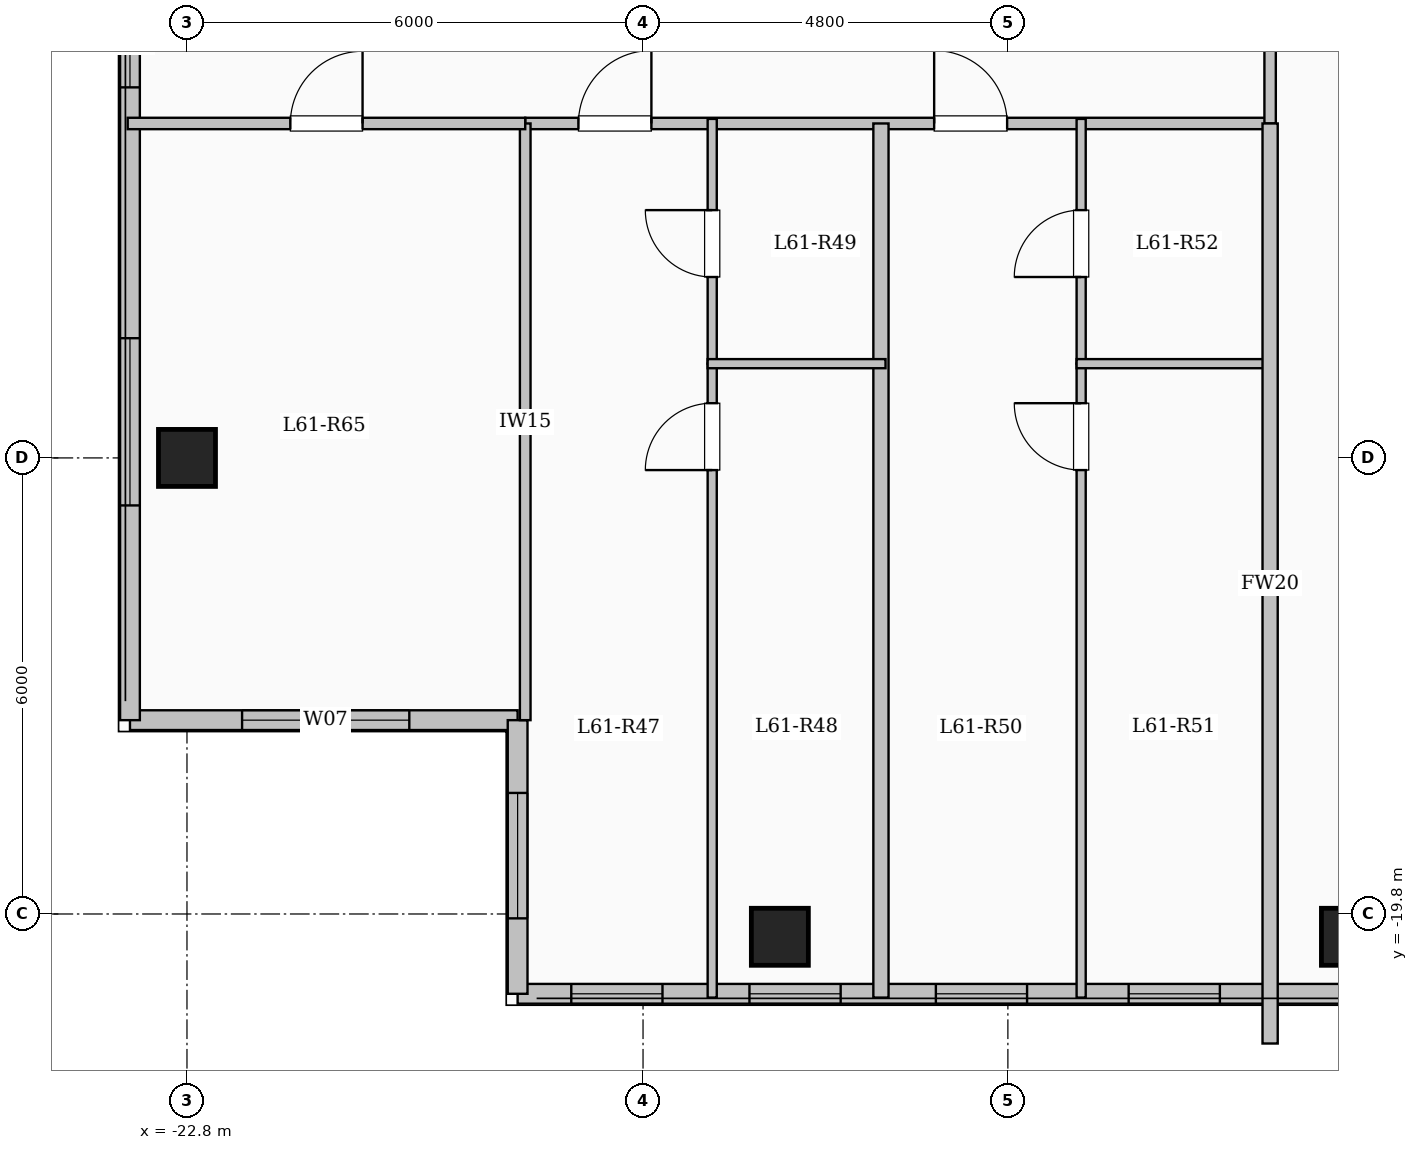
"""IFC4 building model, lengths in metres.
Left out: names, types, materials, properties, quantities, classifications, styles, units other than length and angle.
Written with IfcOpenShell. Run it as: python <this file> out.ifc"""

import sys

from ifc_helpers import new_model, si_unit, direction, frame, frame_2d, origin, origin_2d, place, context, subcontext, project, spatial, rectangle, extrude, element, fill, save


model = new_model("IFC4")
c1 = context("Model", 3, precision=1e-05, world=origin(), true_north=direction((0.0, 1.0)))
c2 = subcontext(c1, "Body", "Model", "MODEL_VIEW")
j1 = project(units=[si_unit("LENGTHUNIT", "METRE"), si_unit("PLANEANGLEUNIT", "RADIAN")], contexts=[c1])
p1 = place(None, origin())
s1 = spatial("IfcSite", under=j1, at=p1, CompositionType="ELEMENT")
p2 = place(p1, origin())
s2 = spatial("IfcBuilding", under=s1, at=p2, CompositionType="ELEMENT")
p3 = place(p2, frame((0.0, 0.0, 223.75)))
s3 = spatial("IfcBuildingStorey", under=s2, at=p3, CompositionType="ELEMENT", Elevation=223.75)
for number, where, z_axis, x_axis in (
    (1, (-15.0, -20.1, 0.0), (0.0, 0.0, 1.0), (1.0, 0.0, 0.0)),
    (2, (-7.5, -20.1, 0.0), (0.0, 0.0, 1.0), (1.0, 0.0, 0.0)),
    (3, (-22.8, -13.8, 0.0), (0.0, 0.0, 1.0), (1.0, 0.0, 0.0)),
):
    element("IfcColumn", number, at=place(p3, frame(where, z_axis=z_axis, x_axis=x_axis)), inside=s3, PredefinedType="COLUMN", context=c2, shape_type="SweptSolid", body=[
        extrude(rectangle(XDim=0.75, YDim=0.75, at=origin_2d()), origin(), (0.0, 0.0, 1.0), 3.35),
    ])
p4 = place(p3, frame((-18.45, -17.25, 0.0), z_axis=(0.0, 0.0, 1.0), x_axis=(-1.0, 0.0, 0.0)))
e4 = element("IfcWall", 4, at=p4, inside=s3, PredefinedType="SOLIDWALL", context=c2, shape_type="SweptSolid", body=[
    extrude(rectangle(XDim=5.1, YDim=0.26, at=frame_2d((2.55, 0.0))), origin(), (0.0, 0.0, 1.0), 3.05),
])
p5 = place(p4, frame((1.425, 0.0, 0.9)))
e5 = element("IfcOpeningElement", 5, at=p5, cuts=e4, PredefinedType="OPENING", context=c2, shape_type="SweptSolid", body=[
    extrude(rectangle(XDim=2.2, YDim=1.75, at=frame_2d((1.1, 0.875))), frame((0.0, 0.14, 0.0), z_axis=(0.0, -1.0, 0.0), x_axis=(1.0, 0.0, 0.0)), (0.0, 0.0, 1.0), 0.28),
])
p6 = place(p3, frame((-23.55, -17.25, 0.0), z_axis=(0.0, 0.0, 1.0), x_axis=(0.0, 1.0, 0.0)))
e6 = element("IfcWall", 6, at=p6, inside=s3, PredefinedType="SOLIDWALL", context=c2, shape_type="SweptSolid", body=[
    extrude(rectangle(XDim=34.5, YDim=0.26, at=frame_2d((17.25, 0.0))), origin(), (0.0, 0.0, 1.0), 3.05),
])
p7 = place(p6, frame((2.825, 0.0, 0.9)))
e7 = element("IfcOpeningElement", 7, at=p7, cuts=e6, PredefinedType="OPENING", context=c2, shape_type="SweptSolid", body=[
    extrude(rectangle(XDim=2.2, YDim=1.75, at=frame_2d((1.1, 0.875))), frame((0.0, 0.14, 0.0), z_axis=(0.0, -1.0, 0.0), x_axis=(1.0, 0.0, 0.0)), (0.0, 0.0, 1.0), 0.28),
])
p8 = place(p6, frame((8.325, 0.0, 0.95)))
e8 = element("IfcOpeningElement", 8, at=p8, cuts=e6, PredefinedType="OPENING", context=c2, shape_type="SweptSolid", body=[
    extrude(rectangle(XDim=1.2, YDim=1.5, at=frame_2d((0.6, 0.75))), frame((0.0, 0.14, 0.0), z_axis=(0.0, -1.0, 0.0), x_axis=(1.0, 0.0, 0.0)), (0.0, 0.0, 1.0), 0.28),
])
p9 = place(p6, frame((13.25, 0.0, 0.9)))
e9 = element("IfcOpeningElement", 9, at=p9, cuts=e6, PredefinedType="OPENING", context=c2, shape_type="SweptSolid", body=[
    extrude(rectangle(XDim=2.2, YDim=1.75, at=frame_2d((1.1, 0.875))), frame((0.0, 0.14, 0.0), z_axis=(0.0, -1.0, 0.0), x_axis=(1.0, 0.0, 0.0)), (0.0, 0.0, 1.0), 0.28),
])
p10 = place(p6, frame((19.65, 0.0, 0.9)))
e10 = element("IfcOpeningElement", 10, at=p10, cuts=e6, PredefinedType="OPENING", context=c2, shape_type="SweptSolid", body=[
    extrude(rectangle(XDim=1.65, YDim=1.6, at=frame_2d((0.825, 0.8))), frame((0.0, 0.14, 0.0), z_axis=(0.0, -1.0, 0.0), x_axis=(1.0, 0.0, 0.0)), (0.0, 0.0, 1.0), 0.28),
])
p11 = place(p6, frame((24.125, 0.0, 0.9)))
e11 = element("IfcOpeningElement", 11, at=p11, cuts=e6, PredefinedType="OPENING", context=c2, shape_type="SweptSolid", body=[
    extrude(rectangle(XDim=2.0, YDim=1.7, at=frame_2d((1.0, 0.85))), frame((0.0, 0.14, 0.0), z_axis=(0.0, -1.0, 0.0), x_axis=(1.0, 0.0, 0.0)), (0.0, 0.0, 1.0), 0.28),
])
p12 = place(p6, frame((28.375, 0.0, 0.95)))
e12 = element("IfcOpeningElement", 12, at=p12, cuts=e6, PredefinedType="OPENING", context=c2, shape_type="SweptSolid", body=[
    extrude(rectangle(XDim=1.0, YDim=1.5, at=frame_2d((0.5, 0.75))), frame((0.0, 0.14, 0.0), z_axis=(0.0, -1.0, 0.0), x_axis=(1.0, 0.0, 0.0)), (0.0, 0.0, 1.0), 0.28),
])
p13 = place(p6, frame((31.125, 0.0, 0.9)))
e13 = element("IfcOpeningElement", 13, at=p13, cuts=e6, PredefinedType="OPENING", context=c2, shape_type="SweptSolid", body=[
    extrude(rectangle(XDim=2.0, YDim=1.7, at=frame_2d((1.0, 0.85))), frame((0.0, 0.14, 0.0), z_axis=(0.0, -1.0, 0.0), x_axis=(1.0, 0.0, 0.0)), (0.0, 0.0, 1.0), 0.28),
])
p14 = place(p3, frame((-7.35, -20.85, 0.0), z_axis=(0.0, 0.0, 1.0), x_axis=(-1.0, 0.0, 0.0)))
e14 = element("IfcWall", 14, at=p14, inside=s3, PredefinedType="SOLIDWALL", context=c2, shape_type="SweptSolid", body=[
    extrude(rectangle(XDim=11.1, YDim=0.26, at=frame_2d((5.55, 0.0))), origin(), (0.0, 0.0, 1.0), 3.05),
])
p15 = place(p14, frame((1.861, 0.0, 0.95)))
e15 = element("IfcOpeningElement", 15, at=p15, cuts=e14, PredefinedType="OPENING", context=c2, shape_type="SweptSolid", body=[
    extrude(rectangle(XDim=1.2, YDim=1.5, at=frame_2d((0.6, 0.75))), frame((0.0, 0.14, 0.0), z_axis=(0.0, -1.0, 0.0), x_axis=(1.0, 0.0, 0.0)), (0.0, 0.0, 1.0), 0.28),
])
p16 = place(p14, frame((4.397, 0.0, 0.95)))
e16 = element("IfcOpeningElement", 16, at=p16, cuts=e14, PredefinedType="OPENING", context=c2, shape_type="SweptSolid", body=[
    extrude(rectangle(XDim=1.2, YDim=1.5, at=frame_2d((0.6, 0.75))), frame((0.0, 0.14, 0.0), z_axis=(0.0, -1.0, 0.0), x_axis=(1.0, 0.0, 0.0)), (0.0, 0.0, 1.0), 0.28),
])
p17 = place(p14, frame((6.85, 0.0, 0.95)))
e17 = element("IfcOpeningElement", 17, at=p17, cuts=e14, PredefinedType="OPENING", context=c2, shape_type="SweptSolid", body=[
    extrude(rectangle(XDim=1.2, YDim=1.5, at=frame_2d((0.6, 0.75))), frame((0.0, 0.14, 0.0), z_axis=(0.0, -1.0, 0.0), x_axis=(1.0, 0.0, 0.0)), (0.0, 0.0, 1.0), 0.28),
])
p18 = place(p14, frame((9.194, 0.0, 0.95)))
e18 = element("IfcOpeningElement", 18, at=p18, cuts=e14, PredefinedType="OPENING", context=c2, shape_type="SweptSolid", body=[
    extrude(rectangle(XDim=1.2, YDim=1.5, at=frame_2d((0.6, 0.75))), frame((0.0, 0.14, 0.0), z_axis=(0.0, -1.0, 0.0), x_axis=(1.0, 0.0, 0.0)), (0.0, 0.0, 1.0), 0.28),
])
p19 = place(p3, frame((-18.45, -20.85, 0.0), z_axis=(0.0, 0.0, 1.0), x_axis=(0.0, 1.0, 0.0)))
e19 = element("IfcWall", 19, at=p19, inside=s3, PredefinedType="SOLIDWALL", context=c2, shape_type="SweptSolid", body=[
    extrude(rectangle(XDim=3.6, YDim=0.26, at=frame_2d((1.8, 0.0))), origin(), (0.0, 0.0, 1.0), 3.05),
])
p20 = place(p19, frame((0.992, 0.0, 0.9)))
e20 = element("IfcOpeningElement", 20, at=p20, cuts=e19, PredefinedType="OPENING", context=c2, shape_type="SweptSolid", body=[
    extrude(rectangle(XDim=1.65, YDim=1.6, at=frame_2d((0.825, 0.8))), frame((0.0, 0.14, 0.0), z_axis=(0.0, -1.0, 0.0), x_axis=(1.0, 0.0, 0.0)), (0.0, 0.0, 1.0), 0.28),
])
p21 = place(p3, frame((-18.35, -9.4, 0.0), z_axis=(0.0, 0.0, 1.0), x_axis=(1.0, 0.0, 0.0)))
e21 = element("IfcWall", 21, at=p21, inside=s3, PredefinedType="PARTITIONING", context=c2, shape_type="SweptSolid", body=[
    extrude(rectangle(XDim=9.8, YDim=0.15, at=frame_2d((4.9, 0.0))), origin(), (0.0, 0.0, 1.0), 3.05),
])
p22 = place(p21, frame((0.7, 0.0, 0.0)))
e22 = element("IfcOpeningElement", 22, at=p22, cuts=e21, PredefinedType="OPENING", context=c2, shape_type="SweptSolid", body=[
    extrude(rectangle(XDim=0.96, YDim=2.15, at=frame_2d((0.48, 1.075))), frame((0.0, 0.085, 0.0), z_axis=(0.0, -1.0, 0.0), x_axis=(1.0, 0.0, 0.0)), (0.0, 0.0, 1.0), 0.17),
])
p23 = place(p21, frame((5.38, 0.0, 0.0)))
e23 = element("IfcOpeningElement", 23, at=p23, cuts=e21, PredefinedType="OPENING", context=c2, shape_type="SweptSolid", body=[
    extrude(rectangle(XDim=0.96, YDim=2.15, at=frame_2d((0.48, 1.075))), frame((0.0, 0.085, 0.0), z_axis=(0.0, -1.0, 0.0), x_axis=(1.0, 0.0, 0.0)), (0.0, 0.0, 1.0), 0.17),
])
p24 = place(p3, frame((-8.55, -9.4, 0.0), z_axis=(0.0, 0.0, 1.0), x_axis=(0.0, 1.0, 0.0)))
e24 = element("IfcWall", 24, at=p24, inside=s3, PredefinedType="PARTITIONING", context=c2, shape_type="SweptSolid", body=[
    extrude(rectangle(XDim=2.15, YDim=0.15, at=frame_2d((1.075, 0.0))), origin(), (0.0, 0.0, 1.0), 3.05),
])
p25 = place(p3, frame((-13.67, -20.9, 0.0), z_axis=(0.0, 0.0, 1.0), x_axis=(0.0, 1.0, 0.0)))
e25 = element("IfcWall", 25, at=p25, inside=s3, PredefinedType="SOLIDWALL", context=c2, shape_type="SweptSolid", body=[
    extrude(rectangle(XDim=11.5, YDim=0.2, at=frame_2d((5.75, 0.0))), origin(), (0.0, 0.0, 1.0), 3.05),
])
p26 = place(p3, frame((-15.89, -20.9, 0.0), z_axis=(0.0, 0.0, 1.0), x_axis=(0.0, 1.0, 0.0)))
e26 = element("IfcWall", 26, at=p26, inside=s3, PredefinedType="PARTITIONING", context=c2, shape_type="SweptSolid", body=[
    extrude(rectangle(XDim=8.34, YDim=0.12, at=frame_2d((4.17, 0.0))), origin(), (0.0, 0.0, 1.0), 3.05),
])
p27 = place(p26, frame((6.94, 0.0, 0.0)))
e27 = element("IfcOpeningElement", 27, at=p27, cuts=e26, PredefinedType="OPENING", context=c2, shape_type="SweptSolid", body=[
    extrude(rectangle(XDim=0.88, YDim=2.1, at=frame_2d((0.44, 1.05))), frame((0.0, 0.07, 0.0), z_axis=(0.0, -1.0, 0.0), x_axis=(1.0, 0.0, 0.0)), (0.0, 0.0, 1.0), 0.14),
])
p28 = place(p3, frame((-15.89, -12.56, 0.0), z_axis=(0.0, 0.0, 1.0), x_axis=(0.0, 1.0, 0.0)))
e28 = element("IfcWall", 28, at=p28, inside=s3, PredefinedType="PARTITIONING", context=c2, shape_type="SweptSolid", body=[
    extrude(rectangle(XDim=3.22, YDim=0.12, at=frame_2d((1.61, 0.0))), origin(), (0.0, 0.0, 1.0), 3.05),
])
p29 = place(p28, frame((1.14, 0.0, 0.0)))
e29 = element("IfcOpeningElement", 29, at=p29, cuts=e28, PredefinedType="OPENING", context=c2, shape_type="SweptSolid", body=[
    extrude(rectangle(XDim=0.88, YDim=2.1, at=frame_2d((0.44, 1.05))), frame((0.0, 0.07, 0.0), z_axis=(0.0, -1.0, 0.0), x_axis=(1.0, 0.0, 0.0)), (0.0, 0.0, 1.0), 0.14),
])
p30 = place(p3, frame((-15.95, -12.56, 0.0), z_axis=(0.0, 0.0, 1.0), x_axis=(1.0, 0.0, 0.0)))
e30 = element("IfcWall", 30, at=p30, inside=s3, PredefinedType="PARTITIONING", context=c2, shape_type="SweptSolid", body=[
    extrude(rectangle(XDim=2.34, YDim=0.12, at=frame_2d((1.17, 0.0))), origin(), (0.0, 0.0, 1.0), 2.675),
])
p31 = place(p3, frame((-11.036, -20.9, 0.0), z_axis=(0.0, 0.0, 1.0), x_axis=(0.0, 1.0, 0.0)))
e31 = element("IfcWall", 31, at=p31, inside=s3, PredefinedType="PARTITIONING", context=c2, shape_type="SweptSolid", body=[
    extrude(rectangle(XDim=8.34, YDim=0.12, at=frame_2d((4.17, 0.0))), origin(), (0.0, 0.0, 1.0), 3.05),
])
p32 = place(p31, frame((6.94, 0.0, 0.0)))
e32 = element("IfcOpeningElement", 32, at=p32, cuts=e31, PredefinedType="OPENING", context=c2, shape_type="SweptSolid", body=[
    extrude(rectangle(XDim=0.88, YDim=2.1, at=frame_2d((0.44, 1.05))), frame((0.0, 0.07, 0.0), z_axis=(0.0, -1.0, 0.0), x_axis=(1.0, 0.0, 0.0)), (0.0, 0.0, 1.0), 0.14),
])
p33 = place(p3, frame((-11.036, -12.56, 0.0), z_axis=(0.0, 0.0, 1.0), x_axis=(0.0, 1.0, 0.0)))
e33 = element("IfcWall", 33, at=p33, inside=s3, PredefinedType="PARTITIONING", context=c2, shape_type="SweptSolid", body=[
    extrude(rectangle(XDim=3.22, YDim=0.12, at=frame_2d((1.61, 0.0))), origin(), (0.0, 0.0, 1.0), 3.05),
])
p34 = place(p33, frame((1.14, 0.0, 0.0)))
e34 = element("IfcOpeningElement", 34, at=p34, cuts=e33, PredefinedType="OPENING", context=c2, shape_type="SweptSolid", body=[
    extrude(rectangle(XDim=0.88, YDim=2.1, at=frame_2d((0.44, 1.05))), frame((0.0, 0.07, 0.0), z_axis=(0.0, -1.0, 0.0), x_axis=(1.0, 0.0, 0.0)), (0.0, 0.0, 1.0), 0.14),
])
p35 = place(p3, frame((-11.096, -12.56, 0.0), z_axis=(0.0, 0.0, 1.0), x_axis=(1.0, 0.0, 0.0)))
e35 = element("IfcWall", 35, at=p35, inside=s3, PredefinedType="PARTITIONING", context=c2, shape_type="SweptSolid", body=[
    extrude(rectangle(XDim=2.556, YDim=0.12, at=frame_2d((1.278, 0.0))), origin(), (0.0, 0.0, 1.0), 2.675),
])
p36 = place(p3, frame((-8.55, -21.504, 0.0), z_axis=(0.0, 0.0, 1.0), x_axis=(0.0, 1.0, 0.0)))
e36 = element("IfcWall", 36, at=p36, inside=s3, PredefinedType="SOLIDWALL", context=c2, shape_type="SweptSolid", body=[
    extrude(rectangle(XDim=12.104, YDim=0.2, at=frame_2d((6.052, 0.0))), origin(), (0.0, 0.0, 1.0), 3.05),
])
p37 = place(p3, frame((-18.35, -17.25, 0.0), z_axis=(0.0, 0.0, 1.0), x_axis=(0.0, 1.0, 0.0)))
e37 = element("IfcWall", 37, at=p37, inside=s3, PredefinedType="PARTITIONING", context=c2, shape_type="SweptSolid", body=[
    extrude(rectangle(XDim=7.85, YDim=0.14, at=frame_2d((3.925, 0.0))), origin(), (0.0, 0.0, 1.0), 3.05),
])
p38 = place(p3, frame((-23.58, -9.4, 0.0), z_axis=(0.0, 0.0, 1.0), x_axis=(1.0, 0.0, 0.0)))
e38 = element("IfcWall", 38, at=p38, inside=s3, PredefinedType="PARTITIONING", context=c2, shape_type="SweptSolid", body=[
    extrude(rectangle(XDim=5.23, YDim=0.15, at=frame_2d((2.615, 0.0))), origin(), (0.0, 0.0, 1.0), 3.05),
])
p39 = place(p38, frame((2.14, 0.0, 0.0)))
e39 = element("IfcOpeningElement", 39, at=p39, cuts=e38, PredefinedType="OPENING", context=c2, shape_type="SweptSolid", body=[
    extrude(rectangle(XDim=0.95, YDim=2.15, at=frame_2d((0.475, 1.075))), frame((0.0, 0.085, 0.0), z_axis=(0.0, -1.0, 0.0), x_axis=(1.0, 0.0, 0.0)), (0.0, 0.0, 1.0), 0.17),
])
p40 = place(p5, origin())
e40 = element("IfcWindow", 40, at=p40, inside=s3, PartitioningType="SINGLE_PANEL", PredefinedType="WINDOW", context=c2, shape_type="SweptSolid", body=[
    extrude(rectangle(XDim=2.2, YDim=1.75, at=frame_2d((1.1, 0.875))), frame((0.0, 0.03, 0.0), z_axis=(0.0, -1.0, 0.0), x_axis=(1.0, 0.0, 0.0)), (0.0, 0.0, 1.0), 0.06),
])
fill(e5, e40)
p41 = place(p7, origin())
e41 = element("IfcWindow", 41, at=p41, inside=s3, PartitioningType="SINGLE_PANEL", PredefinedType="WINDOW", context=c2, shape_type="SweptSolid", body=[
    extrude(rectangle(XDim=2.2, YDim=1.75, at=frame_2d((1.1, 0.875))), frame((0.0, 0.03, 0.0), z_axis=(0.0, -1.0, 0.0), x_axis=(1.0, 0.0, 0.0)), (0.0, 0.0, 1.0), 0.06),
])
fill(e7, e41)
p42 = place(p8, origin())
e42 = element("IfcWindow", 42, at=p42, inside=s3, PartitioningType="SINGLE_PANEL", PredefinedType="WINDOW", context=c2, shape_type="SweptSolid", body=[
    extrude(rectangle(XDim=1.2, YDim=1.5, at=frame_2d((0.6, 0.75))), frame((0.0, 0.03, 0.0), z_axis=(0.0, -1.0, 0.0), x_axis=(1.0, 0.0, 0.0)), (0.0, 0.0, 1.0), 0.06),
])
fill(e8, e42)
p43 = place(p15, origin())
e43 = element("IfcWindow", 43, at=p43, inside=s3, PartitioningType="SINGLE_PANEL", PredefinedType="WINDOW", context=c2, shape_type="SweptSolid", body=[
    extrude(rectangle(XDim=1.2, YDim=1.5, at=frame_2d((0.6, 0.75))), frame((0.0, 0.03, 0.0), z_axis=(0.0, -1.0, 0.0), x_axis=(1.0, 0.0, 0.0)), (0.0, 0.0, 1.0), 0.06),
])
fill(e15, e43)
p44 = place(p16, origin())
e44 = element("IfcWindow", 44, at=p44, inside=s3, PartitioningType="SINGLE_PANEL", PredefinedType="WINDOW", context=c2, shape_type="SweptSolid", body=[
    extrude(rectangle(XDim=1.2, YDim=1.5, at=frame_2d((0.6, 0.75))), frame((0.0, 0.03, 0.0), z_axis=(0.0, -1.0, 0.0), x_axis=(1.0, 0.0, 0.0)), (0.0, 0.0, 1.0), 0.06),
])
fill(e16, e44)
p45 = place(p17, origin())
e45 = element("IfcWindow", 45, at=p45, inside=s3, PartitioningType="SINGLE_PANEL", PredefinedType="WINDOW", context=c2, shape_type="SweptSolid", body=[
    extrude(rectangle(XDim=1.2, YDim=1.5, at=frame_2d((0.6, 0.75))), frame((0.0, 0.03, 0.0), z_axis=(0.0, -1.0, 0.0), x_axis=(1.0, 0.0, 0.0)), (0.0, 0.0, 1.0), 0.06),
])
fill(e17, e45)
p46 = place(p18, origin())
e46 = element("IfcWindow", 46, at=p46, inside=s3, PartitioningType="SINGLE_PANEL", PredefinedType="WINDOW", context=c2, shape_type="SweptSolid", body=[
    extrude(rectangle(XDim=1.2, YDim=1.5, at=frame_2d((0.6, 0.75))), frame((0.0, 0.03, 0.0), z_axis=(0.0, -1.0, 0.0), x_axis=(1.0, 0.0, 0.0)), (0.0, 0.0, 1.0), 0.06),
])
fill(e18, e46)
p47 = place(p20, origin())
e47 = element("IfcWindow", 47, at=p47, inside=s3, PartitioningType="SINGLE_PANEL", PredefinedType="WINDOW", context=c2, shape_type="SweptSolid", body=[
    extrude(rectangle(XDim=1.65, YDim=1.6, at=frame_2d((0.825, 0.8))), frame((0.0, 0.03, 0.0), z_axis=(0.0, -1.0, 0.0), x_axis=(1.0, 0.0, 0.0)), (0.0, 0.0, 1.0), 0.06),
])
fill(e20, e47)
p48 = place(p22, origin())
e48 = element("IfcDoor", 48, at=p48, inside=s3, OperationType="SINGLE_SWING_RIGHT", PredefinedType="DOOR", context=c2, shape_type="SweptSolid", body=[
    extrude(rectangle(XDim=0.96, YDim=2.15, at=frame_2d((0.48, 1.075))), frame((0.0, 0.025, 0.0), z_axis=(0.0, -1.0, 0.0), x_axis=(1.0, 0.0, 0.0)), (0.0, 0.0, 1.0), 0.05),
])
fill(e22, e48)
p49 = place(p27, origin())
e49 = element("IfcDoor", 49, at=p49, inside=s3, OperationType="SINGLE_SWING_LEFT", PredefinedType="DOOR", context=c2, shape_type="SweptSolid", body=[
    extrude(rectangle(XDim=0.88, YDim=2.1, at=frame_2d((0.44, 1.05))), frame((0.0, 0.025, 0.0), z_axis=(0.0, -1.0, 0.0), x_axis=(1.0, 0.0, 0.0)), (0.0, 0.0, 1.0), 0.05),
])
fill(e27, e49)
p50 = place(p29, origin())
e50 = element("IfcDoor", 50, at=p50, inside=s3, OperationType="SINGLE_SWING_RIGHT", PredefinedType="DOOR", context=c2, shape_type="SweptSolid", body=[
    extrude(rectangle(XDim=0.88, YDim=2.1, at=frame_2d((0.44, 1.05))), frame((0.0, 0.025, 0.0), z_axis=(0.0, -1.0, 0.0), x_axis=(1.0, 0.0, 0.0)), (0.0, 0.0, 1.0), 0.05),
])
fill(e29, e50)
p51 = place(p23, origin())
e51 = element("IfcDoor", 51, at=p51, inside=s3, OperationType="SINGLE_SWING_LEFT", PredefinedType="DOOR", context=c2, shape_type="SweptSolid", body=[
    extrude(rectangle(XDim=0.96, YDim=2.15, at=frame_2d((0.48, 1.075))), frame((0.0, 0.025, 0.0), z_axis=(0.0, -1.0, 0.0), x_axis=(1.0, 0.0, 0.0)), (0.0, 0.0, 1.0), 0.05),
])
fill(e23, e51)
p52 = place(p32, origin())
e52 = element("IfcDoor", 52, at=p52, inside=s3, OperationType="SINGLE_SWING_RIGHT", PredefinedType="DOOR", context=c2, shape_type="SweptSolid", body=[
    extrude(rectangle(XDim=0.88, YDim=2.1, at=frame_2d((0.44, 1.05))), frame((0.0, 0.025, 0.0), z_axis=(0.0, -1.0, 0.0), x_axis=(1.0, 0.0, 0.0)), (0.0, 0.0, 1.0), 0.05),
])
fill(e32, e52)
p53 = place(p34, origin())
e53 = element("IfcDoor", 53, at=p53, inside=s3, OperationType="SINGLE_SWING_LEFT", PredefinedType="DOOR", context=c2, shape_type="SweptSolid", body=[
    extrude(rectangle(XDim=0.88, YDim=2.1, at=frame_2d((0.44, 1.05))), frame((0.0, 0.025, 0.0), z_axis=(0.0, -1.0, 0.0), x_axis=(1.0, 0.0, 0.0)), (0.0, 0.0, 1.0), 0.05),
])
fill(e34, e53)
p54 = place(p39, origin())
e54 = element("IfcDoor", 54, at=p54, inside=s3, OperationType="SINGLE_SWING_RIGHT", PredefinedType="DOOR", context=c2, shape_type="SweptSolid", body=[
    extrude(rectangle(XDim=0.95, YDim=2.15, at=frame_2d((0.475, 1.075))), frame((0.0, 0.025, 0.0), z_axis=(0.0, -1.0, 0.0), x_axis=(1.0, 0.0, 0.0)), (0.0, 0.0, 1.0), 0.05),
])
fill(e39, e54)
save(model, sys.argv[1])
